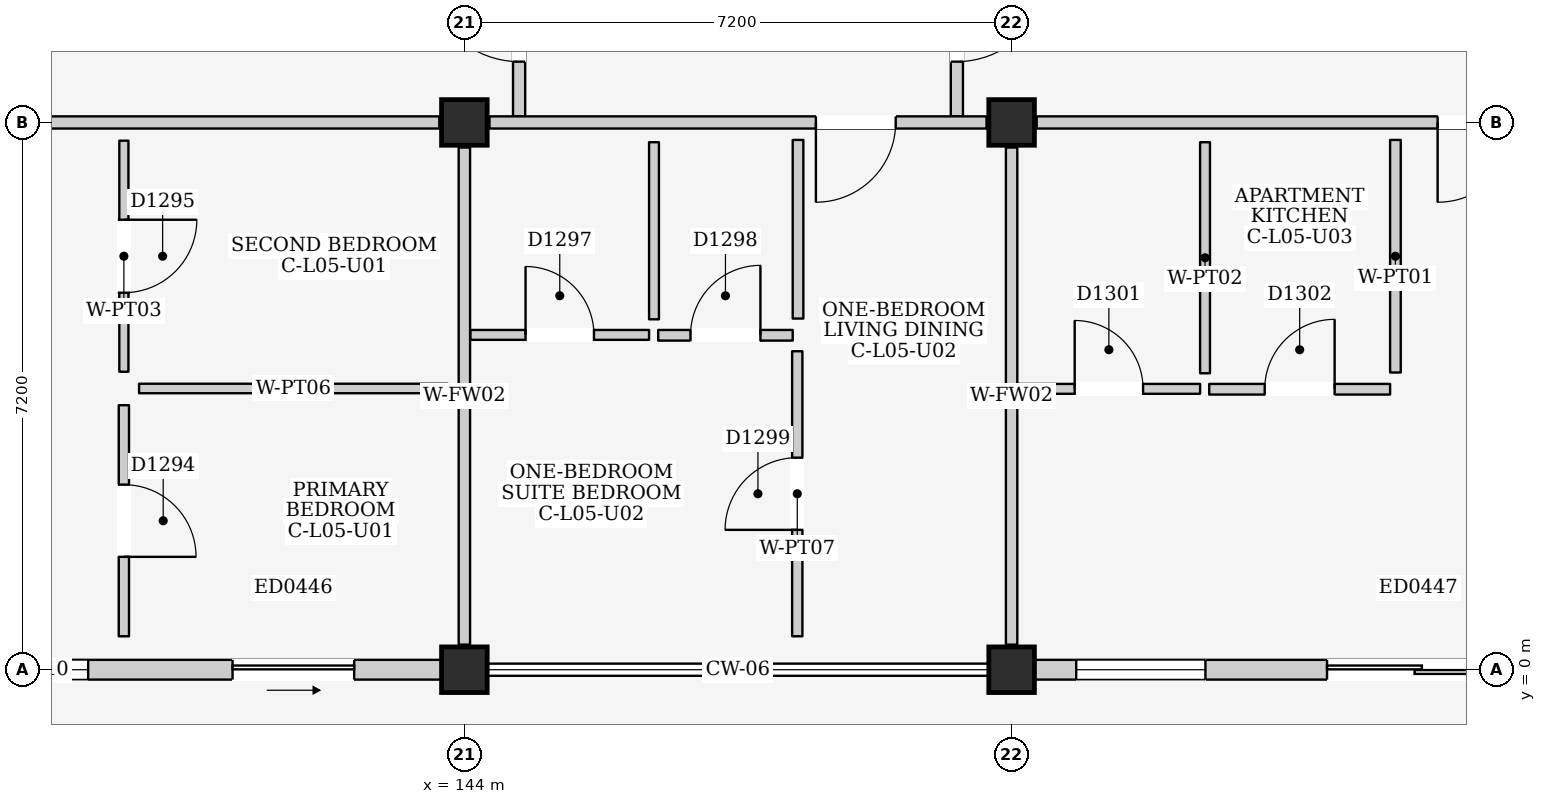
"""IFC4 building model, lengths in metres.
Left out: names, types, materials, properties, quantities, classifications, styles, units other than length and angle.
Written with IfcOpenShell. Run it as: python <this file> out.ifc"""

import sys

from ifc_helpers import new_model, si_unit, direction, frame, frame_2d, origin, origin_2d, place, context, subcontext, project, spatial, rectangle, extrude, element, fill, save


model = new_model("IFC4")
c1 = context("Model", 3, precision=1e-05, world=origin(), true_north=direction((0.0, 1.0)))
c2 = subcontext(c1, "Body", "Model", "MODEL_VIEW")
j1 = project(units=[si_unit("LENGTHUNIT", "METRE"), si_unit("PLANEANGLEUNIT", "RADIAN")], contexts=[c1])
p1 = place(None, origin())
s1 = spatial("IfcSite", under=j1, at=p1, CompositionType="ELEMENT")
p2 = place(p1, origin())
s2 = spatial("IfcBuilding", under=s1, at=p2, CompositionType="ELEMENT")
p3 = place(p2, frame((0.0, 0.0, 18.6)))
s3 = spatial("IfcBuildingStorey", under=s2, at=p3, CompositionType="ELEMENT", Elevation=18.6)
for number, where, z_axis, x_axis in (
    (1, (144.0, 0.0, 0.0), (0.0, 0.0, 1.0), (1.0, 0.0, 0.0)),
    (2, (144.0, 7.2, 0.0), (0.0, 0.0, 1.0), (1.0, 0.0, 0.0)),
    (3, (151.2, 0.0, 0.0), (0.0, 0.0, 1.0), (1.0, 0.0, 0.0)),
    (4, (151.2, 7.2, 0.0), (0.0, 0.0, 1.0), (1.0, 0.0, 0.0)),
):
    element("IfcColumn", number, at=place(p3, frame(where, z_axis=z_axis, x_axis=x_axis)), inside=s3, PredefinedType="COLUMN", context=c2, shape_type="SweptSolid", body=[
        extrude(rectangle(XDim=0.6, YDim=0.6, at=origin_2d()), origin(), (0.0, 0.0, 1.0), 3.3),
    ])
p4 = place(p3, frame((137.1, 0.0, 0.0), z_axis=(0.0, 0.0, 1.0), x_axis=(1.0, 0.0, 0.0)))
e5 = element("IfcWall", 5, at=p4, inside=s3, PredefinedType="ELEMENTEDWALL", context=c2, shape_type="SweptSolid", body=[
    extrude(rectangle(XDim=6.6, YDim=0.26, at=frame_2d((3.3, 0.0))), origin(), (0.0, 0.0, 1.0), 2.595),
])
p5 = place(p4, frame((3.85, 0.0, 0.0)))
e6 = element("IfcOpeningElement", 6, at=p5, cuts=e5, PredefinedType="OPENING", context=c2, shape_type="SweptSolid", body=[
    extrude(rectangle(XDim=1.6, YDim=2.12, at=frame_2d((0.8, 1.06))), frame((0.0, 0.145, 0.0), z_axis=(0.0, -1.0, 0.0), x_axis=(1.0, 0.0, 0.0)), (0.0, 0.0, 1.0), 0.29),
])
p6 = place(p4, frame((0.55, 0.0, 0.9)))
e7 = element("IfcOpeningElement", 7, at=p6, cuts=e5, PredefinedType="OPENING", context=c2, shape_type="SweptSolid", body=[
    extrude(rectangle(XDim=1.4, YDim=1.2, at=frame_2d((0.7, 0.6))), frame((0.0, 0.145, 0.0), z_axis=(0.0, -1.0, 0.0), x_axis=(1.0, 0.0, 0.0)), (0.0, 0.0, 1.0), 0.29),
])
p7 = place(p3, frame((151.5, 0.0, 0.0), z_axis=(0.0, 0.0, 1.0), x_axis=(1.0, 0.0, 0.0)))
e8 = element("IfcWall", 8, at=p7, inside=s3, PredefinedType="ELEMENTEDWALL", context=c2, shape_type="SweptSolid", body=[
    extrude(rectangle(XDim=6.6, YDim=0.26, at=frame_2d((3.3, 0.0))), origin(), (0.0, 0.0, 1.0), 2.595),
])
p8 = place(p7, frame((3.85, 0.0, 0.0)))
e9 = element("IfcOpeningElement", 9, at=p8, cuts=e8, PredefinedType="OPENING", context=c2, shape_type="SweptSolid", body=[
    extrude(rectangle(XDim=2.4, YDim=2.12, at=frame_2d((1.2, 1.06))), frame((0.0, 0.145, 0.0), z_axis=(0.0, -1.0, 0.0), x_axis=(1.0, 0.0, 0.0)), (0.0, 0.0, 1.0), 0.29),
])
p9 = place(p7, frame((0.55, 0.0, 0.9)))
e10 = element("IfcOpeningElement", 10, at=p9, cuts=e8, PredefinedType="OPENING", context=c2, shape_type="SweptSolid", body=[
    extrude(rectangle(XDim=1.7, YDim=1.45, at=frame_2d((0.85, 0.725))), frame((0.0, 0.145, 0.0), z_axis=(0.0, -1.0, 0.0), x_axis=(1.0, 0.0, 0.0)), (0.0, 0.0, 1.0), 0.29),
])
p10 = place(p3, frame((144.72, 7.28, 0.0), z_axis=(0.0, 0.0, 1.0), x_axis=(0.0, 1.0, 0.0)))
e11 = element("IfcWall", 11, at=p10, inside=s3, PredefinedType="PARTITIONING", context=c2, shape_type="SweptSolid", body=[
    extrude(rectangle(XDim=4.32, YDim=0.16, at=frame_2d((2.16, 0.0))), origin(), (0.0, 0.0, 1.0), 3.06),
])
p11 = place(p10, frame((0.72, 0.0, 0.0)))
e12 = element("IfcOpeningElement", 12, at=p11, cuts=e11, PredefinedType="OPENING", context=c2, shape_type="SweptSolid", body=[
    extrude(rectangle(XDim=1.2, YDim=2.2, at=frame_2d((0.6, 1.1))), frame((0.0, 0.095, 0.0), z_axis=(0.0, -1.0, 0.0), x_axis=(1.0, 0.0, 0.0)), (0.0, 0.0, 1.0), 0.19),
])
p12 = place(p3, frame((150.48, 7.28, 0.0), z_axis=(0.0, 0.0, 1.0), x_axis=(0.0, 1.0, 0.0)))
e13 = element("IfcWall", 13, at=p12, inside=s3, PredefinedType="PARTITIONING", context=c2, shape_type="SweptSolid", body=[
    extrude(rectangle(XDim=4.32, YDim=0.16, at=frame_2d((2.16, 0.0))), origin(), (0.0, 0.0, 1.0), 3.06),
])
p13 = place(p12, frame((0.72, 0.0, 0.0)))
e14 = element("IfcOpeningElement", 14, at=p13, cuts=e13, PredefinedType="OPENING", context=c2, shape_type="SweptSolid", body=[
    extrude(rectangle(XDim=1.2, YDim=2.2, at=frame_2d((0.6, 1.1))), frame((0.0, 0.095, 0.0), z_axis=(0.0, -1.0, 0.0), x_axis=(1.0, 0.0, 0.0)), (0.0, 0.0, 1.0), 0.19),
])
p14 = place(p3, frame((137.13, 7.2, 0.0), z_axis=(0.0, 0.0, 1.0), x_axis=(1.0, 0.0, 0.0)))
e15 = element("IfcWall", 15, at=p14, inside=s3, PredefinedType="PARTITIONING", context=c2, shape_type="SweptSolid", body=[
    extrude(rectangle(XDim=6.54, YDim=0.16, at=frame_2d((3.27, 0.0))), origin(), (0.0, 0.0, 1.0), 2.445),
])
p15 = place(p3, frame((144.0, 0.33, 0.0), z_axis=(0.0, 0.0, 1.0), x_axis=(0.0, 1.0, 0.0)))
e16 = element("IfcWall", 16, at=p15, inside=s3, PredefinedType="PARTITIONING", context=c2, shape_type="SweptSolid", body=[
    extrude(rectangle(XDim=6.54, YDim=0.15, at=frame_2d((3.27, 0.0))), origin(), (0.0, 0.0, 1.0), 2.545),
])
p16 = place(p3, frame((139.52, 0.44, 0.0), z_axis=(0.0, 0.0, 1.0), x_axis=(0.0, 1.0, 0.0)))
e17 = element("IfcWall", 17, at=p16, inside=s3, PredefinedType="PARTITIONING", context=c2, shape_type="SweptSolid", body=[
    extrude(rectangle(XDim=3.04, YDim=0.135, at=frame_2d((1.52, 0.0))), origin(), (0.0, 0.0, 1.0), 3.06),
])
p17 = place(p16, frame((1.045, 0.0, 0.0)))
e18 = element("IfcOpeningElement", 18, at=p17, cuts=e17, PredefinedType="OPENING", context=c2, shape_type="SweptSolid", body=[
    extrude(rectangle(XDim=0.95, YDim=2.15, at=frame_2d((0.475, 1.075))), frame((0.0, 0.083, 0.0), z_axis=(0.0, -1.0, 0.0), x_axis=(1.0, 0.0, 0.0)), (0.0, 0.0, 1.0), 0.165),
])
p18 = place(p3, frame((139.72, 3.7, 0.0), z_axis=(0.0, 0.0, 1.0), x_axis=(1.0, 0.0, 0.0)))
e19 = element("IfcWall", 19, at=p18, inside=s3, PredefinedType="PARTITIONING", context=c2, shape_type="SweptSolid", body=[
    extrude(rectangle(XDim=4.06, YDim=0.125, at=frame_2d((2.03, 0.0))), origin(), (0.0, 0.0, 1.0), 3.06),
])
p19 = place(p3, frame((139.52, 3.92, 0.0), z_axis=(0.0, 0.0, 1.0), x_axis=(0.0, 1.0, 0.0)))
e20 = element("IfcWall", 20, at=p19, inside=s3, PredefinedType="PARTITIONING", context=c2, shape_type="SweptSolid", body=[
    extrude(rectangle(XDim=3.04, YDim=0.12, at=frame_2d((1.52, 0.0))), origin(), (0.0, 0.0, 1.0), 3.06),
])
p20 = place(p19, frame((1.04, 0.0, 0.0)))
e21 = element("IfcOpeningElement", 21, at=p20, cuts=e20, PredefinedType="OPENING", context=c2, shape_type="SweptSolid", body=[
    extrude(rectangle(XDim=0.96, YDim=2.15, at=frame_2d((0.48, 1.075))), frame((0.0, 0.075, 0.0), z_axis=(0.0, -1.0, 0.0), x_axis=(1.0, 0.0, 0.0)), (0.0, 0.0, 1.0), 0.15),
])
p21 = place(p3, frame((144.33, 7.2, 0.0), z_axis=(0.0, 0.0, 1.0), x_axis=(1.0, 0.0, 0.0)))
e22 = element("IfcWall", 22, at=p21, inside=s3, PredefinedType="PARTITIONING", context=c2, shape_type="SweptSolid", body=[
    extrude(rectangle(XDim=6.54, YDim=0.16, at=frame_2d((3.27, 0.0))), origin(), (0.0, 0.0, 1.0), 2.445),
])
p22 = place(p21, frame((4.295, 0.0, 0.0)))
e23 = element("IfcOpeningElement", 23, at=p22, cuts=e22, PredefinedType="OPENING", context=c2, shape_type="SweptSolid", body=[
    extrude(rectangle(XDim=1.05, YDim=2.15, at=frame_2d((0.525, 1.075))), frame((0.0, 0.095, 0.0), z_axis=(0.0, -1.0, 0.0), x_axis=(1.0, 0.0, 0.0)), (0.0, 0.0, 1.0), 0.19),
])
p23 = place(p3, frame((151.2, 0.33, 0.0), z_axis=(0.0, 0.0, 1.0), x_axis=(0.0, 1.0, 0.0)))
e24 = element("IfcWall", 24, at=p23, inside=s3, PredefinedType="PARTITIONING", context=c2, shape_type="SweptSolid", body=[
    extrude(rectangle(XDim=6.54, YDim=0.15, at=frame_2d((3.27, 0.0))), origin(), (0.0, 0.0, 1.0), 2.545),
])
p24 = place(p3, frame((144.08, 4.405, 0.0), z_axis=(0.0, 0.0, 1.0), x_axis=(1.0, 0.0, 0.0)))
e25 = element("IfcWall", 25, at=p24, inside=s3, PredefinedType="PARTITIONING", context=c2, shape_type="SweptSolid", body=[
    extrude(rectangle(XDim=2.35, YDim=0.13, at=frame_2d((1.175, 0.0))), origin(), (0.0, 0.0, 1.0), 3.06),
])
p25 = place(p24, frame((0.725, 0.0, 0.0)))
e26 = element("IfcOpeningElement", 26, at=p25, cuts=e25, PredefinedType="OPENING", context=c2, shape_type="SweptSolid", body=[
    extrude(rectangle(XDim=0.9, YDim=2.1, at=frame_2d((0.45, 1.05))), frame((0.0, 0.08, 0.0), z_axis=(0.0, -1.0, 0.0), x_axis=(1.0, 0.0, 0.0)), (0.0, 0.0, 1.0), 0.16),
])
p26 = place(p3, frame((146.495, 4.61, 0.0), z_axis=(0.0, 0.0, 1.0), x_axis=(0.0, 1.0, 0.0)))
e27 = element("IfcWall", 27, at=p26, inside=s3, PredefinedType="PARTITIONING", context=c2, shape_type="SweptSolid", body=[
    extrude(rectangle(XDim=2.33, YDim=0.13, at=frame_2d((1.165, 0.0))), origin(), (0.0, 0.0, 1.0), 3.06),
])
p27 = place(p3, frame((146.55, 4.4, 0.0), z_axis=(0.0, 0.0, 1.0), x_axis=(1.0, 0.0, 0.0)))
e28 = element("IfcWall", 28, at=p27, inside=s3, PredefinedType="PARTITIONING", context=c2, shape_type="SweptSolid", body=[
    extrude(rectangle(XDim=1.77, YDim=0.14, at=frame_2d((0.885, 0.0))), origin(), (0.0, 0.0, 1.0), 3.06),
])
p28 = place(p27, frame((0.425, 0.0, 0.0)))
e29 = element("IfcOpeningElement", 29, at=p28, cuts=e28, PredefinedType="OPENING", context=c2, shape_type="SweptSolid", body=[
    extrude(rectangle(XDim=0.92, YDim=2.1, at=frame_2d((0.46, 1.05))), frame((0.0, 0.085, 0.0), z_axis=(0.0, -1.0, 0.0), x_axis=(1.0, 0.0, 0.0)), (0.0, 0.0, 1.0), 0.17),
])
p29 = place(p3, frame((148.39, 4.62, 0.0), z_axis=(0.0, 0.0, 1.0), x_axis=(0.0, 1.0, 0.0)))
e30 = element("IfcWall", 30, at=p29, inside=s3, PredefinedType="PARTITIONING", context=c2, shape_type="SweptSolid", body=[
    extrude(rectangle(XDim=2.35, YDim=0.14, at=frame_2d((1.175, 0.0))), origin(), (0.0, 0.0, 1.0), 3.06),
])
p30 = place(p3, frame((148.38, 0.44, 0.0), z_axis=(0.0, 0.0, 1.0), x_axis=(0.0, 1.0, 0.0)))
e31 = element("IfcWall", 31, at=p30, inside=s3, PredefinedType="PARTITIONING", context=c2, shape_type="SweptSolid", body=[
    extrude(rectangle(XDim=3.75, YDim=0.135, at=frame_2d((1.875, 0.0))), origin(), (0.0, 0.0, 1.0), 3.06),
])
p31 = place(p30, frame((1.4, 0.0, 0.0)))
e32 = element("IfcOpeningElement", 32, at=p31, cuts=e31, PredefinedType="OPENING", context=c2, shape_type="SweptSolid", body=[
    extrude(rectangle(XDim=0.95, YDim=2.15, at=frame_2d((0.475, 1.075))), frame((0.0, 0.083, 0.0), z_axis=(0.0, -1.0, 0.0), x_axis=(1.0, 0.0, 0.0)), (0.0, 0.0, 1.0), 0.165),
])
p32 = place(p3, frame((151.53, 7.2, 0.0), z_axis=(0.0, 0.0, 1.0), x_axis=(1.0, 0.0, 0.0)))
e33 = element("IfcWall", 33, at=p32, inside=s3, PredefinedType="PARTITIONING", context=c2, shape_type="SweptSolid", body=[
    extrude(rectangle(XDim=6.54, YDim=0.16, at=frame_2d((3.27, 0.0))), origin(), (0.0, 0.0, 1.0), 2.445),
])
p33 = place(p32, frame((5.275, 0.0, 0.0)))
e34 = element("IfcOpeningElement", 34, at=p33, cuts=e33, PredefinedType="OPENING", context=c2, shape_type="SweptSolid", body=[
    extrude(rectangle(XDim=1.05, YDim=2.15, at=frame_2d((0.525, 1.075))), frame((0.0, 0.095, 0.0), z_axis=(0.0, -1.0, 0.0), x_axis=(1.0, 0.0, 0.0)), (0.0, 0.0, 1.0), 0.19),
])
p34 = place(p3, frame((151.28, 3.695, 0.0), z_axis=(0.0, 0.0, 1.0), x_axis=(1.0, 0.0, 0.0)))
e35 = element("IfcWall", 35, at=p34, inside=s3, PredefinedType="PARTITIONING", context=c2, shape_type="SweptSolid", body=[
    extrude(rectangle(XDim=2.4, YDim=0.13, at=frame_2d((1.2, 0.0))), origin(), (0.0, 0.0, 1.0), 3.06),
])
p35 = place(p34, frame((0.75, 0.0, 0.0)))
e36 = element("IfcOpeningElement", 36, at=p35, cuts=e35, PredefinedType="OPENING", context=c2, shape_type="SweptSolid", body=[
    extrude(rectangle(XDim=0.9, YDim=2.1, at=frame_2d((0.45, 1.05))), frame((0.0, 0.08, 0.0), z_axis=(0.0, -1.0, 0.0), x_axis=(1.0, 0.0, 0.0)), (0.0, 0.0, 1.0), 0.16),
])
p36 = place(p3, frame((153.745, 3.9, 0.0), z_axis=(0.0, 0.0, 1.0), x_axis=(0.0, 1.0, 0.0)))
e37 = element("IfcWall", 37, at=p36, inside=s3, PredefinedType="PARTITIONING", context=c2, shape_type="SweptSolid", body=[
    extrude(rectangle(XDim=3.04, YDim=0.13, at=frame_2d((1.52, 0.0))), origin(), (0.0, 0.0, 1.0), 3.06),
])
p37 = place(p3, frame((153.8, 3.69, 0.0), z_axis=(0.0, 0.0, 1.0), x_axis=(1.0, 0.0, 0.0)))
e38 = element("IfcWall", 38, at=p37, inside=s3, PredefinedType="PARTITIONING", context=c2, shape_type="SweptSolid", body=[
    extrude(rectangle(XDim=2.38, YDim=0.14, at=frame_2d((1.19, 0.0))), origin(), (0.0, 0.0, 1.0), 3.06),
])
p38 = place(p37, frame((0.73, 0.0, 0.0)))
e39 = element("IfcOpeningElement", 39, at=p38, cuts=e38, PredefinedType="OPENING", context=c2, shape_type="SweptSolid", body=[
    extrude(rectangle(XDim=0.92, YDim=2.1, at=frame_2d((0.46, 1.05))), frame((0.0, 0.085, 0.0), z_axis=(0.0, -1.0, 0.0), x_axis=(1.0, 0.0, 0.0)), (0.0, 0.0, 1.0), 0.17),
])
p39 = place(p3, frame((156.25, 3.91, 0.0), z_axis=(0.0, 0.0, 1.0), x_axis=(0.0, 1.0, 0.0)))
e40 = element("IfcWall", 40, at=p39, inside=s3, PredefinedType="PARTITIONING", context=c2, shape_type="SweptSolid", body=[
    extrude(rectangle(XDim=3.06, YDim=0.14, at=frame_2d((1.53, 0.0))), origin(), (0.0, 0.0, 1.0), 3.06),
])
p40 = place(p5, frame((1.6, 0.0, 0.0), z_axis=(0.0, 0.0, 1.0), x_axis=(-1.0, 0.0, 0.0)))
e41 = element("IfcDoor", 41, at=p40, inside=s3, OperationType="SLIDING_TO_RIGHT", PredefinedType="DOOR", context=c2, shape_type="SweptSolid", body=[
    extrude(rectangle(XDim=1.6, YDim=2.12, at=frame_2d((0.8, 1.06))), frame((0.0, 0.025, 0.0), z_axis=(0.0, -1.0, 0.0), x_axis=(1.0, 0.0, 0.0)), (0.0, 0.0, 1.0), 0.05),
])
fill(e6, e41)
p41 = place(p6, origin())
e42 = element("IfcWindow", 42, at=p41, inside=s3, PartitioningType="DOUBLE_PANEL_HORIZONTAL", PredefinedType="WINDOW", context=c2, shape_type="SweptSolid", body=[
    extrude(rectangle(XDim=1.4, YDim=1.2, at=frame_2d((0.7, 0.6))), frame((0.0, 0.03, 0.0), z_axis=(0.0, -1.0, 0.0), x_axis=(1.0, 0.0, 0.0)), (0.0, 0.0, 1.0), 0.06),
])
fill(e7, e42)
p42 = place(p8, frame((2.4, 0.0, 0.0), z_axis=(0.0, 0.0, 1.0), x_axis=(-1.0, 0.0, 0.0)))
e43 = element("IfcDoor", 43, at=p42, inside=s3, OperationType="DOUBLE_DOOR_SLIDING", PredefinedType="DOOR", context=c2, shape_type="SweptSolid", body=[
    extrude(rectangle(XDim=2.4, YDim=2.12, at=frame_2d((1.2, 1.06))), frame((0.0, 0.025, 0.0), z_axis=(0.0, -1.0, 0.0), x_axis=(1.0, 0.0, 0.0)), (0.0, 0.0, 1.0), 0.05),
])
fill(e9, e43)
p43 = place(p9, origin())
e44 = element("IfcWindow", 44, at=p43, inside=s3, PartitioningType="DOUBLE_PANEL_VERTICAL", PredefinedType="WINDOW", context=c2, shape_type="SweptSolid", body=[
    extrude(rectangle(XDim=1.7, YDim=1.45, at=frame_2d((0.85, 0.725))), frame((0.0, 0.03, 0.0), z_axis=(0.0, -1.0, 0.0), x_axis=(1.0, 0.0, 0.0)), (0.0, 0.0, 1.0), 0.06),
])
fill(e10, e44)
p44 = place(p11, origin())
e45 = element("IfcDoor", 45, at=p44, inside=s3, OperationType="SINGLE_SWING_RIGHT", PredefinedType="DOOR", context=c2, shape_type="SweptSolid", body=[
    extrude(rectangle(XDim=1.2, YDim=2.2, at=frame_2d((0.6, 1.1))), frame((0.0, 0.025, 0.0), z_axis=(0.0, -1.0, 0.0), x_axis=(1.0, 0.0, 0.0)), (0.0, 0.0, 1.0), 0.05),
])
fill(e12, e45)
p45 = place(p13, frame((1.2, 0.0, 0.0), z_axis=(0.0, 0.0, 1.0), x_axis=(-1.0, 0.0, 0.0)))
e46 = element("IfcDoor", 46, at=p45, inside=s3, OperationType="SINGLE_SWING_LEFT", PredefinedType="DOOR", context=c2, shape_type="SweptSolid", body=[
    extrude(rectangle(XDim=1.2, YDim=2.2, at=frame_2d((0.6, 1.1))), frame((0.0, 0.025, 0.0), z_axis=(0.0, -1.0, 0.0), x_axis=(1.0, 0.0, 0.0)), (0.0, 0.0, 1.0), 0.05),
])
fill(e14, e46)
p46 = place(p17, frame((0.95, 0.0, 0.0), z_axis=(0.0, 0.0, 1.0), x_axis=(-1.0, 0.0, 0.0)))
e47 = element("IfcDoor", 47, at=p46, inside=s3, OperationType="SINGLE_SWING_RIGHT", PredefinedType="DOOR", context=c2, shape_type="SweptSolid", body=[
    extrude(rectangle(XDim=0.95, YDim=2.15, at=frame_2d((0.475, 1.075))), frame((0.0, 0.025, 0.0), z_axis=(0.0, -1.0, 0.0), x_axis=(1.0, 0.0, 0.0)), (0.0, 0.0, 1.0), 0.05),
])
fill(e18, e47)
p47 = place(p20, frame((0.96, 0.0, 0.0), z_axis=(0.0, 0.0, 1.0), x_axis=(-1.0, 0.0, 0.0)))
e48 = element("IfcDoor", 48, at=p47, inside=s3, OperationType="SINGLE_SWING_LEFT", PredefinedType="DOOR", context=c2, shape_type="SweptSolid", body=[
    extrude(rectangle(XDim=0.96, YDim=2.15, at=frame_2d((0.48, 1.075))), frame((0.0, 0.025, 0.0), z_axis=(0.0, -1.0, 0.0), x_axis=(1.0, 0.0, 0.0)), (0.0, 0.0, 1.0), 0.05),
])
fill(e21, e48)
p48 = place(p22, frame((1.05, 0.0, 0.0), z_axis=(0.0, 0.0, 1.0), x_axis=(-1.0, 0.0, 0.0)))
e49 = element("IfcDoor", 49, at=p48, inside=s3, OperationType="SINGLE_SWING_RIGHT", PredefinedType="DOOR", context=c2, shape_type="SweptSolid", body=[
    extrude(rectangle(XDim=1.05, YDim=2.15, at=frame_2d((0.525, 1.075))), frame((0.0, 0.025, 0.0), z_axis=(0.0, -1.0, 0.0), x_axis=(1.0, 0.0, 0.0)), (0.0, 0.0, 1.0), 0.05),
])
fill(e23, e49)
p49 = place(p25, origin())
e50 = element("IfcDoor", 50, at=p49, inside=s3, OperationType="SINGLE_SWING_LEFT", PredefinedType="DOOR", context=c2, shape_type="SweptSolid", body=[
    extrude(rectangle(XDim=0.9, YDim=2.1, at=frame_2d((0.45, 1.05))), frame((0.0, 0.025, 0.0), z_axis=(0.0, -1.0, 0.0), x_axis=(1.0, 0.0, 0.0)), (0.0, 0.0, 1.0), 0.05),
])
fill(e26, e50)
p50 = place(p28, origin())
e51 = element("IfcDoor", 51, at=p50, inside=s3, OperationType="SINGLE_SWING_RIGHT", PredefinedType="DOOR", context=c2, shape_type="SweptSolid", body=[
    extrude(rectangle(XDim=0.92, YDim=2.1, at=frame_2d((0.46, 1.05))), frame((0.0, 0.025, 0.0), z_axis=(0.0, -1.0, 0.0), x_axis=(1.0, 0.0, 0.0)), (0.0, 0.0, 1.0), 0.05),
])
fill(e29, e51)
p51 = place(p31, origin())
e52 = element("IfcDoor", 52, at=p51, inside=s3, OperationType="SINGLE_SWING_LEFT", PredefinedType="DOOR", context=c2, shape_type="SweptSolid", body=[
    extrude(rectangle(XDim=0.95, YDim=2.15, at=frame_2d((0.475, 1.075))), frame((0.0, 0.025, 0.0), z_axis=(0.0, -1.0, 0.0), x_axis=(1.0, 0.0, 0.0)), (0.0, 0.0, 1.0), 0.05),
])
fill(e32, e52)
p52 = place(p33, frame((1.05, 0.0, 0.0), z_axis=(0.0, 0.0, 1.0), x_axis=(-1.0, 0.0, 0.0)))
e53 = element("IfcDoor", 53, at=p52, inside=s3, OperationType="SINGLE_SWING_RIGHT", PredefinedType="DOOR", context=c2, shape_type="SweptSolid", body=[
    extrude(rectangle(XDim=1.05, YDim=2.15, at=frame_2d((0.525, 1.075))), frame((0.0, 0.025, 0.0), z_axis=(0.0, -1.0, 0.0), x_axis=(1.0, 0.0, 0.0)), (0.0, 0.0, 1.0), 0.05),
])
fill(e34, e53)
p53 = place(p35, origin())
e54 = element("IfcDoor", 54, at=p53, inside=s3, OperationType="SINGLE_SWING_LEFT", PredefinedType="DOOR", context=c2, shape_type="SweptSolid", body=[
    extrude(rectangle(XDim=0.9, YDim=2.1, at=frame_2d((0.45, 1.05))), frame((0.0, 0.025, 0.0), z_axis=(0.0, -1.0, 0.0), x_axis=(1.0, 0.0, 0.0)), (0.0, 0.0, 1.0), 0.05),
])
fill(e36, e54)
p54 = place(p38, origin())
e55 = element("IfcDoor", 55, at=p54, inside=s3, OperationType="SINGLE_SWING_RIGHT", PredefinedType="DOOR", context=c2, shape_type="SweptSolid", body=[
    extrude(rectangle(XDim=0.92, YDim=2.1, at=frame_2d((0.46, 1.05))), frame((0.0, 0.025, 0.0), z_axis=(0.0, -1.0, 0.0), x_axis=(1.0, 0.0, 0.0)), (0.0, 0.0, 1.0), 0.05),
])
fill(e39, e55)
save(model, sys.argv[1])
